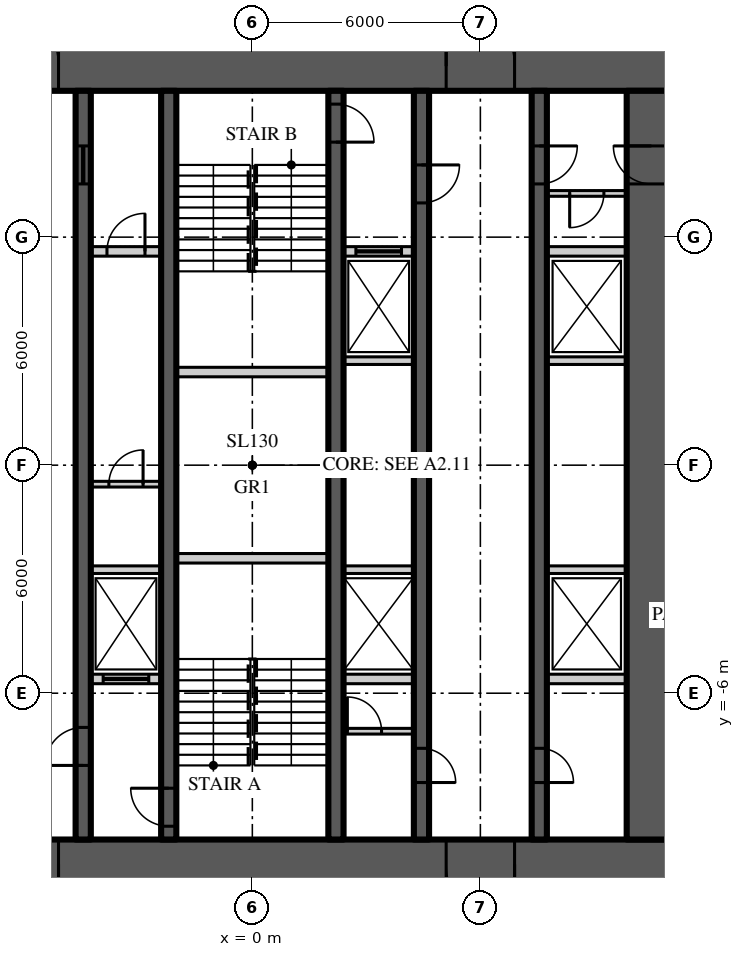
"""IFC4 building model, lengths in metres.
Left out: names, types, materials, properties, quantities, classifications, styles, units other than length and angle.
Written with IfcOpenShell. Run it as: python <this file> out.ifc"""

import sys

from ifc_helpers import new_model, si_unit, direction, frame, frame_2d, origin, place, context, subcontext, project, spatial, rectangle, extrude, element, fill, save


model = new_model("IFC4")
c1 = context("Model", 3, precision=1e-05, world=origin(), true_north=direction((0.0, 1.0)))
c2 = subcontext(c1, "Body", "Model", "MODEL_VIEW")
j1 = project(units=[si_unit("LENGTHUNIT", "METRE"), si_unit("PLANEANGLEUNIT", "RADIAN")], contexts=[c1])
p1 = place(None, origin())
s1 = spatial("IfcSite", under=j1, at=p1, CompositionType="ELEMENT")
p2 = place(p1, origin())
s2 = spatial("IfcBuilding", under=s1, at=p2, CompositionType="ELEMENT")
p3 = place(p2, frame((0.0, 0.0, 63.0)))
s3 = spatial("IfcBuildingStorey", under=s2, at=p3, CompositionType="ELEMENT", Elevation=63.0)
p4 = place(p3, frame((-11.15, 10.5, 0.0), z_axis=(0.0, 0.0, 1.0), x_axis=(1.0, 0.0, 0.0)))
e1 = element("IfcWall", 1, at=p4, inside=s3, PredefinedType="SHEAR", context=c2, shape_type="SweptSolid", body=[
    extrude(rectangle(XDim=22.3, YDim=1.3, at=frame_2d((11.15, 0.0))), origin(), (0.0, 0.0, 1.0), 3.9),
])
p5 = place(p4, frame((4.25, 0.0, 0.0)))
e2 = element("IfcOpeningElement", 2, at=p5, cuts=e1, PredefinedType="OPENING", context=c2, shape_type="SweptSolid", body=[
    extrude(rectangle(XDim=1.8, YDim=2.2, at=frame_2d((0.9, 1.1))), frame((0.0, 0.66, 0.0), z_axis=(0.0, -1.0, 0.0), x_axis=(1.0, 0.0, 0.0)), (0.0, 0.0, 1.0), 1.32),
])
p6 = place(p4, frame((16.25, 0.0, 0.0)))
e3 = element("IfcOpeningElement", 3, at=p6, cuts=e1, PredefinedType="OPENING", context=c2, shape_type="SweptSolid", body=[
    extrude(rectangle(XDim=1.8, YDim=2.2, at=frame_2d((0.9, 1.1))), frame((0.0, 0.66, 0.0), z_axis=(0.0, -1.0, 0.0), x_axis=(1.0, 0.0, 0.0)), (0.0, 0.0, 1.0), 1.32),
])
p7 = place(p3, frame((11.15, -10.5, 0.0), z_axis=(0.0, 0.0, 1.0), x_axis=(-1.0, 0.0, 0.0)))
e4 = element("IfcWall", 4, at=p7, inside=s3, PredefinedType="SHEAR", context=c2, shape_type="SweptSolid", body=[
    extrude(rectangle(XDim=22.3, YDim=1.3, at=frame_2d((11.15, 0.0))), origin(), (0.0, 0.0, 1.0), 3.9),
])
p8 = place(p7, frame((16.25, 0.0, 0.0)))
e5 = element("IfcOpeningElement", 5, at=p8, cuts=e4, PredefinedType="OPENING", context=c2, shape_type="SweptSolid", body=[
    extrude(rectangle(XDim=1.8, YDim=2.2, at=frame_2d((0.9, 1.1))), frame((0.0, 0.66, 0.0), z_axis=(0.0, -1.0, 0.0), x_axis=(1.0, 0.0, 0.0)), (0.0, 0.0, 1.0), 1.32),
])
p9 = place(p7, frame((4.25, 0.0, 0.0)))
e6 = element("IfcOpeningElement", 6, at=p9, cuts=e4, PredefinedType="OPENING", context=c2, shape_type="SweptSolid", body=[
    extrude(rectangle(XDim=1.8, YDim=2.2, at=frame_2d((0.9, 1.1))), frame((0.0, 0.66, 0.0), z_axis=(0.0, -1.0, 0.0), x_axis=(1.0, 0.0, 0.0)), (0.0, 0.0, 1.0), 1.32),
])
p10 = place(p3, frame((10.5, -9.85, 0.0), z_axis=(0.0, 0.0, 1.0), x_axis=(0.0, 1.0, 0.0)))
e7 = element("IfcWall", 7, at=p10, inside=s3, PredefinedType="SHEAR", context=c2, shape_type="SweptSolid", body=[
    extrude(rectangle(XDim=19.7, YDim=1.3, at=frame_2d((9.85, 0.0))), origin(), (0.0, 0.0, 1.0), 3.9),
])
p11 = place(p10, frame((17.25, 0.0, 0.0)))
e8 = element("IfcOpeningElement", 8, at=p11, cuts=e7, PredefinedType="OPENING", context=c2, shape_type="SweptSolid", body=[
    extrude(rectangle(XDim=1.0, YDim=2.2, at=frame_2d((0.5, 1.1))), frame((0.0, 0.66, 0.0), z_axis=(0.0, -1.0, 0.0), x_axis=(1.0, 0.0, 0.0)), (0.0, 0.0, 1.0), 1.32),
])
p12 = place(p3, frame((7.55, 9.85, 0.0), z_axis=(0.0, 0.0, 1.0), x_axis=(0.0, -1.0, 0.0)))
e9 = element("IfcWall", 9, at=p12, inside=s3, PredefinedType="SHEAR", context=c2, shape_type="SweptSolid", body=[
    extrude(rectangle(XDim=19.7, YDim=0.4, at=frame_2d((9.85, 0.0))), origin(), (0.0, 0.0, 1.0), 3.9),
])
p13 = place(p12, frame((1.45, 0.0, 0.0)))
e10 = element("IfcOpeningElement", 10, at=p13, cuts=e9, PredefinedType="OPENING", context=c2, shape_type="SweptSolid", body=[
    extrude(rectangle(XDim=1.0, YDim=2.2, at=frame_2d((0.5, 1.1))), frame((0.0, 0.21, 0.0), z_axis=(0.0, -1.0, 0.0), x_axis=(1.0, 0.0, 0.0)), (0.0, 0.0, 1.0), 0.42),
])
p14 = place(p12, frame((17.3, 0.0, 0.0)))
e11 = element("IfcOpeningElement", 11, at=p14, cuts=e9, PredefinedType="OPENING", context=c2, shape_type="SweptSolid", body=[
    extrude(rectangle(XDim=0.9, YDim=2.1, at=frame_2d((0.45, 1.05))), frame((0.0, 0.21, 0.0), z_axis=(0.0, -1.0, 0.0), x_axis=(1.0, 0.0, 0.0)), (0.0, 0.0, 1.0), 0.42),
])
p15 = place(p3, frame((-4.45, -9.85, 0.0), z_axis=(0.0, 0.0, 1.0), x_axis=(0.0, 1.0, 0.0)))
e12 = element("IfcWall", 12, at=p15, inside=s3, PredefinedType="SHEAR", context=c2, shape_type="SweptSolid", body=[
    extrude(rectangle(XDim=19.7, YDim=0.4, at=frame_2d((9.85, 0.0))), origin(), (0.0, 0.0, 1.0), 3.9),
])
p16 = place(p15, frame((1.95, 0.0, 0.0)))
e13 = element("IfcOpeningElement", 13, at=p16, cuts=e12, PredefinedType="OPENING", context=c2, shape_type="SweptSolid", body=[
    extrude(rectangle(XDim=1.0, YDim=2.2, at=frame_2d((0.5, 1.1))), frame((0.0, 0.21, 0.0), z_axis=(0.0, -1.0, 0.0), x_axis=(1.0, 0.0, 0.0)), (0.0, 0.0, 1.0), 0.42),
])
p17 = place(p15, frame((17.25, 0.0, 0.0)))
e14 = element("IfcOpeningElement", 14, at=p17, cuts=e12, PredefinedType="OPENING", context=c2, shape_type="SweptSolid", body=[
    extrude(rectangle(XDim=1.0, YDim=2.1, at=frame_2d((0.5, 1.05))), frame((0.0, 0.21, 0.0), z_axis=(0.0, -1.0, 0.0), x_axis=(1.0, 0.0, 0.0)), (0.0, 0.0, 1.0), 0.42),
])
p18 = place(p3, frame((4.45, 9.85, 0.0), z_axis=(0.0, 0.0, 1.0), x_axis=(0.0, -1.0, 0.0)))
e15 = element("IfcWall", 15, at=p18, inside=s3, PredefinedType="SHEAR", context=c2, shape_type="SweptSolid", body=[
    extrude(rectangle(XDim=19.7, YDim=0.4, at=frame_2d((9.85, 0.0))), origin(), (0.0, 0.0, 1.0), 3.9),
])
p19 = place(p18, frame((1.95, 0.0, 0.0)))
e16 = element("IfcOpeningElement", 16, at=p19, cuts=e15, PredefinedType="OPENING", context=c2, shape_type="SweptSolid", body=[
    extrude(rectangle(XDim=1.0, YDim=2.2, at=frame_2d((0.5, 1.1))), frame((0.0, 0.21, 0.0), z_axis=(0.0, -1.0, 0.0), x_axis=(1.0, 0.0, 0.0)), (0.0, 0.0, 1.0), 0.42),
])
p20 = place(p18, frame((17.3, 0.0, 0.0)))
e17 = element("IfcOpeningElement", 17, at=p20, cuts=e15, PredefinedType="OPENING", context=c2, shape_type="SweptSolid", body=[
    extrude(rectangle(XDim=0.9, YDim=2.1, at=frame_2d((0.45, 1.05))), frame((0.0, 0.21, 0.0), z_axis=(0.0, -1.0, 0.0), x_axis=(1.0, 0.0, 0.0)), (0.0, 0.0, 1.0), 0.42),
])
p21 = place(p3, frame((-2.2, -9.85, 0.0), z_axis=(0.0, 0.0, 1.0), x_axis=(0.0, 1.0, 0.0)))
e18 = element("IfcWall", 18, at=p21, inside=s3, PredefinedType="SHEAR", context=c2, shape_type="SweptSolid", body=[
    extrude(rectangle(XDim=19.7, YDim=0.4, at=frame_2d((9.85, 0.0))), origin(), (0.0, 0.0, 1.0), 3.9),
])
p22 = place(p21, frame((0.35, 0.0, 0.0)))
e19 = element("IfcOpeningElement", 19, at=p22, cuts=e18, PredefinedType="OPENING", context=c2, shape_type="SweptSolid", body=[
    extrude(rectangle(XDim=1.0, YDim=2.2, at=frame_2d((0.5, 1.1))), frame((0.0, 0.21, 0.0), z_axis=(0.0, -1.0, 0.0), x_axis=(1.0, 0.0, 0.0)), (0.0, 0.0, 1.0), 0.42),
])
p23 = place(p3, frame((2.2, 9.85, 0.0), z_axis=(0.0, 0.0, 1.0), x_axis=(0.0, -1.0, 0.0)))
e20 = element("IfcWall", 20, at=p23, inside=s3, PredefinedType="SHEAR", context=c2, shape_type="SweptSolid", body=[
    extrude(rectangle(XDim=19.7, YDim=0.4, at=frame_2d((9.85, 0.0))), origin(), (0.0, 0.0, 1.0), 3.9),
])
p24 = place(p23, frame((0.35, 0.0, 0.0)))
e21 = element("IfcOpeningElement", 21, at=p24, cuts=e20, PredefinedType="OPENING", context=c2, shape_type="SweptSolid", body=[
    extrude(rectangle(XDim=1.0, YDim=2.2, at=frame_2d((0.5, 1.1))), frame((0.0, 0.21, 0.0), z_axis=(0.0, -1.0, 0.0), x_axis=(1.0, 0.0, 0.0)), (0.0, 0.0, 1.0), 0.42),
])
p25 = place(p3, frame((-4.25, 5.625, 0.0), z_axis=(0.0, 0.0, 1.0), x_axis=(1.0, 0.0, 0.0)))
e22 = element("IfcWall", 22, at=p25, inside=s3, PredefinedType="SOLIDWALL", context=c2, shape_type="SweptSolid", body=[
    extrude(rectangle(XDim=1.85, YDim=0.25, at=frame_2d((0.925, 0.0))), origin(), (0.0, 0.0, 1.0), 3.7),
])
p26 = place(p25, frame((0.425, 0.0, 0.0)))
e23 = element("IfcOpeningElement", 23, at=p26, cuts=e22, PredefinedType="OPENING", context=c2, shape_type="SweptSolid", body=[
    extrude(rectangle(XDim=1.0, YDim=2.2, at=frame_2d((0.5, 1.1))), frame((0.0, 0.135, 0.0), z_axis=(0.0, -1.0, 0.0), x_axis=(1.0, 0.0, 0.0)), (0.0, 0.0, 1.0), 0.27),
])
p27 = place(p3, frame((2.4, 5.625, 0.0), z_axis=(0.0, 0.0, 1.0), x_axis=(1.0, 0.0, 0.0)))
e24 = element("IfcWall", 24, at=p27, inside=s3, PredefinedType="SOLIDWALL", context=c2, shape_type="SweptSolid", body=[
    extrude(rectangle(XDim=1.85, YDim=0.25, at=frame_2d((0.925, 0.0))), origin(), (0.0, 0.0, 1.0), 3.7),
])
p28 = place(p27, frame((0.325, 0.0, 0.0)))
e25 = element("IfcOpeningElement", 25, at=p28, cuts=e24, PredefinedType="OPENING", context=c2, shape_type="SweptSolid", body=[
    extrude(rectangle(XDim=1.2, YDim=2.2, at=frame_2d((0.6, 1.1))), frame((0.0, 0.135, 0.0), z_axis=(0.0, -1.0, 0.0), x_axis=(1.0, 0.0, 0.0)), (0.0, 0.0, 1.0), 0.27),
])
p29 = place(p3, frame((7.75, 5.625, 0.0), z_axis=(0.0, 0.0, 1.0), x_axis=(1.0, 0.0, 0.0)))
e26 = element("IfcWall", 26, at=p29, inside=s3, PredefinedType="SOLIDWALL", context=c2, shape_type="SweptSolid", body=[
    extrude(rectangle(XDim=2.1, YDim=0.25, at=frame_2d((1.05, 0.0))), origin(), (0.0, 0.0, 1.0), 3.7),
])
p30 = place(p3, frame((-4.25, -5.625, 0.0), z_axis=(0.0, 0.0, 1.0), x_axis=(1.0, 0.0, 0.0)))
e27 = element("IfcWall", 27, at=p30, inside=s3, PredefinedType="SOLIDWALL", context=c2, shape_type="SweptSolid", body=[
    extrude(rectangle(XDim=1.85, YDim=0.25, at=frame_2d((0.925, 0.0))), origin(), (0.0, 0.0, 1.0), 3.7),
])
p31 = place(p30, frame((0.325, 0.0, 0.0)))
e28 = element("IfcOpeningElement", 28, at=p31, cuts=e27, PredefinedType="OPENING", context=c2, shape_type="SweptSolid", body=[
    extrude(rectangle(XDim=1.2, YDim=2.2, at=frame_2d((0.6, 1.1))), frame((0.0, 0.135, 0.0), z_axis=(0.0, -1.0, 0.0), x_axis=(1.0, 0.0, 0.0)), (0.0, 0.0, 1.0), 0.27),
])
p32 = place(p3, frame((2.4, -5.625, 0.0), z_axis=(0.0, 0.0, 1.0), x_axis=(1.0, 0.0, 0.0)))
e29 = element("IfcWall", 29, at=p32, inside=s3, PredefinedType="SOLIDWALL", context=c2, shape_type="SweptSolid", body=[
    extrude(rectangle(XDim=1.85, YDim=0.25, at=frame_2d((0.925, 0.0))), origin(), (0.0, 0.0, 1.0), 3.7),
])
p33 = place(p3, frame((7.75, -5.625, 0.0), z_axis=(0.0, 0.0, 1.0), x_axis=(1.0, 0.0, 0.0)))
e30 = element("IfcWall", 30, at=p33, inside=s3, PredefinedType="SOLIDWALL", context=c2, shape_type="SweptSolid", body=[
    extrude(rectangle(XDim=2.1, YDim=0.25, at=frame_2d((1.05, 0.0))), origin(), (0.0, 0.0, 1.0), 3.7),
])
for number, where, z_axis, x_axis in (
    (31, (-2.0, -2.45, 0.0), (0.0, 0.0, 1.0), (1.0, 0.0, 0.0)),
    (32, (-2.0, 2.45, 0.0), (0.0, 0.0, 1.0), (1.0, 0.0, 0.0)),
):
    element("IfcWall", number, at=place(p3, frame(where, z_axis=z_axis, x_axis=x_axis)), inside=s3, PredefinedType="SOLIDWALL", context=c2, shape_type="SweptSolid", body=[
        extrude(rectangle(XDim=4.0, YDim=0.25, at=frame_2d((2.0, 0.0))), origin(), (0.0, 0.0, 1.0), 3.7),
    ])
for number, where, z_axis, x_axis in (
    (33, (-4.25, -2.75, 0.0), (0.0, 0.0, 1.0), (1.0, 0.0, 0.0)),
    (34, (2.4, -2.75, 0.0), (0.0, 0.0, 1.0), (1.0, 0.0, 0.0)),
):
    element("IfcWall", number, at=place(p3, frame(where, z_axis=z_axis, x_axis=x_axis)), inside=s3, PredefinedType="SOLIDWALL", context=c2, shape_type="SweptSolid", body=[
        extrude(rectangle(XDim=1.85, YDim=0.2, at=frame_2d((0.925, 0.0))), origin(), (0.0, 0.0, 1.0), 3.7),
    ])
p34 = place(p3, frame((7.75, -2.75, 0.0), z_axis=(0.0, 0.0, 1.0), x_axis=(1.0, 0.0, 0.0)))
e35 = element("IfcWall", 35, at=p34, inside=s3, PredefinedType="SOLIDWALL", context=c2, shape_type="SweptSolid", body=[
    extrude(rectangle(XDim=2.1, YDim=0.2, at=frame_2d((1.05, 0.0))), origin(), (0.0, 0.0, 1.0), 3.7),
])
p35 = place(p3, frame((2.4, 2.75, 0.0), z_axis=(0.0, 0.0, 1.0), x_axis=(1.0, 0.0, 0.0)))
e36 = element("IfcWall", 36, at=p35, inside=s3, PredefinedType="SOLIDWALL", context=c2, shape_type="SweptSolid", body=[
    extrude(rectangle(XDim=1.85, YDim=0.2, at=frame_2d((0.925, 0.0))), origin(), (0.0, 0.0, 1.0), 3.7),
])
p36 = place(p3, frame((7.75, 2.75, 0.0), z_axis=(0.0, 0.0, 1.0), x_axis=(1.0, 0.0, 0.0)))
e37 = element("IfcWall", 37, at=p36, inside=s3, PredefinedType="SOLIDWALL", context=c2, shape_type="SweptSolid", body=[
    extrude(rectangle(XDim=2.1, YDim=0.2, at=frame_2d((1.05, 0.0))), origin(), (0.0, 0.0, 1.0), 3.7),
])
p37 = place(p3, frame((-4.25, -0.5, 0.0), z_axis=(0.0, 0.0, 1.0), x_axis=(1.0, 0.0, 0.0)))
e38 = element("IfcWall", 38, at=p37, inside=s3, PredefinedType="SOLIDWALL", context=c2, shape_type="SweptSolid", body=[
    extrude(rectangle(XDim=1.85, YDim=0.15, at=frame_2d((0.925, 0.0))), origin(), (0.0, 0.0, 1.0), 3.77),
])
p38 = place(p37, frame((0.475, 0.0, 0.0)))
e39 = element("IfcOpeningElement", 39, at=p38, cuts=e38, PredefinedType="OPENING", context=c2, shape_type="SweptSolid", body=[
    extrude(rectangle(XDim=0.9, YDim=2.1, at=frame_2d((0.45, 1.05))), frame((0.0, 0.085, 0.0), z_axis=(0.0, -1.0, 0.0), x_axis=(1.0, 0.0, 0.0)), (0.0, 0.0, 1.0), 0.17),
])
p39 = place(p3, frame((2.4, -7.0, 0.0), z_axis=(0.0, 0.0, 1.0), x_axis=(1.0, 0.0, 0.0)))
e40 = element("IfcWall", 40, at=p39, inside=s3, PredefinedType="SOLIDWALL", context=c2, shape_type="SweptSolid", body=[
    extrude(rectangle(XDim=1.85, YDim=0.15, at=frame_2d((0.925, 0.0))), origin(), (0.0, 0.0, 1.0), 3.77),
])
p40 = place(p39, frame((0.1, 0.0, 0.0)))
e41 = element("IfcOpeningElement", 41, at=p40, cuts=e40, PredefinedType="OPENING", context=c2, shape_type="SweptSolid", body=[
    extrude(rectangle(XDim=0.9, YDim=2.1, at=frame_2d((0.45, 1.05))), frame((0.0, 0.085, 0.0), z_axis=(0.0, -1.0, 0.0), x_axis=(1.0, 0.0, 0.0)), (0.0, 0.0, 1.0), 0.17),
])
p41 = place(p3, frame((9.85, 7.15, 0.0), z_axis=(0.0, 0.0, 1.0), x_axis=(-1.0, 0.0, 0.0)))
e42 = element("IfcWall", 42, at=p41, inside=s3, PredefinedType="SOLIDWALL", context=c2, shape_type="SweptSolid", body=[
    extrude(rectangle(XDim=2.1, YDim=0.15, at=frame_2d((1.05, 0.0))), origin(), (0.0, 0.0, 1.0), 3.77),
])
p42 = place(p41, frame((0.6, 0.0, 0.0)))
e43 = element("IfcOpeningElement", 43, at=p42, cuts=e42, PredefinedType="OPENING", context=c2, shape_type="SweptSolid", body=[
    extrude(rectangle(XDim=0.9, YDim=2.1, at=frame_2d((0.45, 1.05))), frame((0.0, 0.085, 0.0), z_axis=(0.0, -1.0, 0.0), x_axis=(1.0, 0.0, 0.0)), (0.0, 0.0, 1.0), 0.17),
])
p43 = place(p5, origin())
e44 = element("IfcDoor", 44, at=p43, inside=s3, OperationType="DOUBLE_DOOR_DOUBLE_SWING", PredefinedType="DOOR", context=c2, shape_type="SweptSolid", body=[
    extrude(rectangle(XDim=1.8, YDim=2.2, at=frame_2d((0.9, 1.1))), frame((0.0, 0.025, 0.0), z_axis=(0.0, -1.0, 0.0), x_axis=(1.0, 0.0, 0.0)), (0.0, 0.0, 1.0), 0.05),
])
fill(e2, e44)
p44 = place(p8, origin())
e45 = element("IfcDoor", 45, at=p44, inside=s3, OperationType="DOUBLE_DOOR_DOUBLE_SWING", PredefinedType="DOOR", context=c2, shape_type="SweptSolid", body=[
    extrude(rectangle(XDim=1.8, YDim=2.2, at=frame_2d((0.9, 1.1))), frame((0.0, 0.025, 0.0), z_axis=(0.0, -1.0, 0.0), x_axis=(1.0, 0.0, 0.0)), (0.0, 0.0, 1.0), 0.05),
])
fill(e5, e45)
p45 = place(p6, origin())
e46 = element("IfcDoor", 46, at=p45, inside=s3, OperationType="DOUBLE_DOOR_DOUBLE_SWING", PredefinedType="DOOR", context=c2, shape_type="SweptSolid", body=[
    extrude(rectangle(XDim=1.8, YDim=2.2, at=frame_2d((0.9, 1.1))), frame((0.0, 0.025, 0.0), z_axis=(0.0, -1.0, 0.0), x_axis=(1.0, 0.0, 0.0)), (0.0, 0.0, 1.0), 0.05),
])
fill(e3, e46)
p46 = place(p9, origin())
e47 = element("IfcDoor", 47, at=p46, inside=s3, OperationType="DOUBLE_DOOR_DOUBLE_SWING", PredefinedType="DOOR", context=c2, shape_type="SweptSolid", body=[
    extrude(rectangle(XDim=1.8, YDim=2.2, at=frame_2d((0.9, 1.1))), frame((0.0, 0.025, 0.0), z_axis=(0.0, -1.0, 0.0), x_axis=(1.0, 0.0, 0.0)), (0.0, 0.0, 1.0), 0.05),
])
fill(e6, e47)
p47 = place(p13, origin())
e48 = element("IfcDoor", 48, at=p47, inside=s3, OperationType="SINGLE_SWING_LEFT", PredefinedType="DOOR", context=c2, shape_type="SweptSolid", body=[
    extrude(rectangle(XDim=1.0, YDim=2.2, at=frame_2d((0.5, 1.1))), frame((0.0, 0.025, 0.0), z_axis=(0.0, -1.0, 0.0), x_axis=(1.0, 0.0, 0.0)), (0.0, 0.0, 1.0), 0.05),
])
fill(e10, e48)
p48 = place(p11, origin())
e49 = element("IfcDoor", 49, at=p48, inside=s3, OperationType="SINGLE_SWING_RIGHT", PredefinedType="DOOR", context=c2, shape_type="SweptSolid", body=[
    extrude(rectangle(XDim=1.0, YDim=2.2, at=frame_2d((0.5, 1.1))), frame((0.0, 0.025, 0.0), z_axis=(0.0, -1.0, 0.0), x_axis=(1.0, 0.0, 0.0)), (0.0, 0.0, 1.0), 0.05),
])
fill(e8, e49)
p49 = place(p16, origin())
e50 = element("IfcDoor", 50, at=p49, inside=s3, OperationType="SINGLE_SWING_LEFT", PredefinedType="DOOR", context=c2, shape_type="SweptSolid", body=[
    extrude(rectangle(XDim=1.0, YDim=2.2, at=frame_2d((0.5, 1.1))), frame((0.0, 0.025, 0.0), z_axis=(0.0, -1.0, 0.0), x_axis=(1.0, 0.0, 0.0)), (0.0, 0.0, 1.0), 0.05),
])
fill(e13, e50)
p50 = place(p22, origin())
e51 = element("IfcDoor", 51, at=p50, inside=s3, OperationType="SINGLE_SWING_RIGHT", PredefinedType="DOOR", context=c2, shape_type="SweptSolid", body=[
    extrude(rectangle(XDim=1.0, YDim=2.2, at=frame_2d((0.5, 1.1))), frame((0.0, 0.025, 0.0), z_axis=(0.0, -1.0, 0.0), x_axis=(1.0, 0.0, 0.0)), (0.0, 0.0, 1.0), 0.05),
])
fill(e19, e51)
p51 = place(p19, origin())
e52 = element("IfcDoor", 52, at=p51, inside=s3, OperationType="SINGLE_SWING_LEFT", PredefinedType="DOOR", context=c2, shape_type="SweptSolid", body=[
    extrude(rectangle(XDim=1.0, YDim=2.2, at=frame_2d((0.5, 1.1))), frame((0.0, 0.025, 0.0), z_axis=(0.0, -1.0, 0.0), x_axis=(1.0, 0.0, 0.0)), (0.0, 0.0, 1.0), 0.05),
])
fill(e16, e52)
p52 = place(p24, origin())
e53 = element("IfcDoor", 53, at=p52, inside=s3, OperationType="SINGLE_SWING_RIGHT", PredefinedType="DOOR", context=c2, shape_type="SweptSolid", body=[
    extrude(rectangle(XDim=1.0, YDim=2.2, at=frame_2d((0.5, 1.1))), frame((0.0, 0.025, 0.0), z_axis=(0.0, -1.0, 0.0), x_axis=(1.0, 0.0, 0.0)), (0.0, 0.0, 1.0), 0.05),
])
fill(e21, e53)
p53 = place(p17, origin())
e54 = element("IfcDoor", 54, at=p53, inside=s3, OperationType="SLIDING_TO_LEFT", PredefinedType="DOOR", context=c2, shape_type="SweptSolid", body=[
    extrude(rectangle(XDim=1.0, YDim=2.1, at=frame_2d((0.5, 1.05))), frame((0.0, 0.025, 0.0), z_axis=(0.0, -1.0, 0.0), x_axis=(1.0, 0.0, 0.0)), (0.0, 0.0, 1.0), 0.05),
])
fill(e14, e54)
p54 = place(p14, origin())
e55 = element("IfcDoor", 55, at=p54, inside=s3, OperationType="SINGLE_SWING_RIGHT", PredefinedType="DOOR", context=c2, shape_type="SweptSolid", body=[
    extrude(rectangle(XDim=0.9, YDim=2.1, at=frame_2d((0.45, 1.05))), frame((0.0, 0.025, 0.0), z_axis=(0.0, -1.0, 0.0), x_axis=(1.0, 0.0, 0.0)), (0.0, 0.0, 1.0), 0.05),
])
fill(e11, e55)
p55 = place(p20, origin())
e56 = element("IfcDoor", 56, at=p55, inside=s3, OperationType="SINGLE_SWING_RIGHT", PredefinedType="DOOR", context=c2, shape_type="SweptSolid", body=[
    extrude(rectangle(XDim=0.9, YDim=2.1, at=frame_2d((0.45, 1.05))), frame((0.0, 0.025, 0.0), z_axis=(0.0, -1.0, 0.0), x_axis=(1.0, 0.0, 0.0)), (0.0, 0.0, 1.0), 0.05),
])
fill(e17, e56)
p56 = place(p31, origin())
e57 = element("IfcDoor", 57, at=p56, inside=s3, OperationType="SLIDING_TO_LEFT", PredefinedType="DOOR", context=c2, shape_type="SweptSolid", body=[
    extrude(rectangle(XDim=1.2, YDim=2.2, at=frame_2d((0.6, 1.1))), frame((0.0, 0.025, 0.0), z_axis=(0.0, -1.0, 0.0), x_axis=(1.0, 0.0, 0.0)), (0.0, 0.0, 1.0), 0.05),
])
fill(e28, e57)
p57 = place(p28, origin())
e58 = element("IfcDoor", 58, at=p57, inside=s3, OperationType="SLIDING_TO_LEFT", PredefinedType="DOOR", context=c2, shape_type="SweptSolid", body=[
    extrude(rectangle(XDim=1.2, YDim=2.2, at=frame_2d((0.6, 1.1))), frame((0.0, 0.025, 0.0), z_axis=(0.0, -1.0, 0.0), x_axis=(1.0, 0.0, 0.0)), (0.0, 0.0, 1.0), 0.05),
])
fill(e25, e58)
p58 = place(p38, origin())
e59 = element("IfcDoor", 59, at=p58, inside=s3, OperationType="SINGLE_SWING_RIGHT", PredefinedType="DOOR", context=c2, shape_type="SweptSolid", body=[
    extrude(rectangle(XDim=0.9, YDim=2.1, at=frame_2d((0.45, 1.05))), frame((0.0, 0.025, 0.0), z_axis=(0.0, -1.0, 0.0), x_axis=(1.0, 0.0, 0.0)), (0.0, 0.0, 1.0), 0.05),
])
fill(e39, e59)
p59 = place(p26, origin())
e60 = element("IfcDoor", 60, at=p59, inside=s3, OperationType="SINGLE_SWING_RIGHT", PredefinedType="DOOR", context=c2, shape_type="SweptSolid", body=[
    extrude(rectangle(XDim=1.0, YDim=2.2, at=frame_2d((0.5, 1.1))), frame((0.0, 0.025, 0.0), z_axis=(0.0, -1.0, 0.0), x_axis=(1.0, 0.0, 0.0)), (0.0, 0.0, 1.0), 0.05),
])
fill(e23, e60)
p60 = place(p40, origin())
e61 = element("IfcDoor", 61, at=p60, inside=s3, OperationType="SINGLE_SWING_LEFT", PredefinedType="DOOR", context=c2, shape_type="SweptSolid", body=[
    extrude(rectangle(XDim=0.9, YDim=2.1, at=frame_2d((0.45, 1.05))), frame((0.0, 0.025, 0.0), z_axis=(0.0, -1.0, 0.0), x_axis=(1.0, 0.0, 0.0)), (0.0, 0.0, 1.0), 0.05),
])
fill(e41, e61)
p61 = place(p42, origin())
e62 = element("IfcDoor", 62, at=p61, inside=s3, OperationType="SINGLE_SWING_RIGHT", PredefinedType="DOOR", context=c2, shape_type="SweptSolid", body=[
    extrude(rectangle(XDim=0.9, YDim=2.1, at=frame_2d((0.45, 1.05))), frame((0.0, 0.025, 0.0), z_axis=(0.0, -1.0, 0.0), x_axis=(1.0, 0.0, 0.0)), (0.0, 0.0, 1.0), 0.05),
])
fill(e43, e62)
save(model, sys.argv[1])
